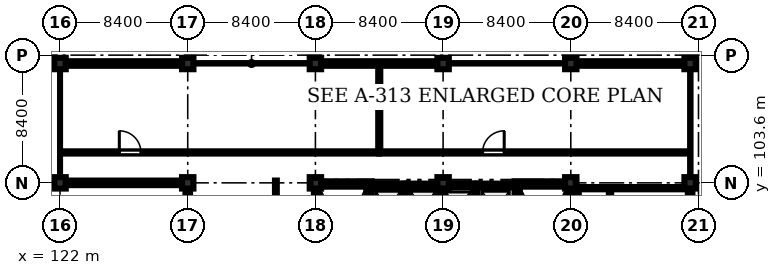
"""IFC4 building model, lengths in metres.
Left out: names, types, materials, properties, quantities, classifications, styles, units other than length and angle.
Written with IfcOpenShell. Run it as: python <this file> out.ifc"""

import sys

from ifc_helpers import new_model, si_unit, direction, frame, frame_2d, origin, origin_2d, place, context, subcontext, project, spatial, rectangle, extrude, element, fill, save


model = new_model("IFC4")
c1 = context("Model", 3, precision=1e-05, world=origin(), true_north=direction((0.0, 1.0)))
c2 = subcontext(c1, "Body", "Model", "MODEL_VIEW")
j1 = project(units=[si_unit("LENGTHUNIT", "METRE"), si_unit("PLANEANGLEUNIT", "RADIAN")], contexts=[c1])
p1 = place(None, origin())
s1 = spatial("IfcSite", under=j1, at=p1, CompositionType="ELEMENT")
p2 = place(p1, origin())
s2 = spatial("IfcBuilding", under=s1, at=p2, CompositionType="ELEMENT")
p3 = place(p2, frame((0.0, 0.0, 44.4)))
s3 = spatial("IfcBuildingStorey", under=s2, at=p3, CompositionType="ELEMENT", Elevation=44.4)
for number, where, z_axis, x_axis in (
    (1, (122.0, 103.6, 0.0), (0.0, 0.0, 1.0), (1.0, 0.0, 0.0)),
    (2, (122.0, 111.45, 0.0), (0.0, 0.0, 1.0), (1.0, 0.0, 0.0)),
    (3, (130.4, 103.6, 0.0), (0.0, 0.0, 1.0), (1.0, 0.0, 0.0)),
    (4, (130.4, 111.45, 0.0), (0.0, 0.0, 1.0), (1.0, 0.0, 0.0)),
    (5, (138.8, 103.6, 0.0), (0.0, 0.0, 1.0), (1.0, 0.0, 0.0)),
    (6, (138.8, 111.45, 0.0), (0.0, 0.0, 1.0), (1.0, 0.0, 0.0)),
    (7, (147.2, 103.6, 0.0), (0.0, 0.0, 1.0), (1.0, 0.0, 0.0)),
    (8, (147.2, 111.45, 0.0), (0.0, 0.0, 1.0), (1.0, 0.0, 0.0)),
    (9, (155.6, 103.6, 0.0), (0.0, 0.0, 1.0), (1.0, 0.0, 0.0)),
    (10, (155.6, 111.45, 0.0), (0.0, 0.0, 1.0), (1.0, 0.0, 0.0)),
    (11, (163.45, 103.6, 0.0), (0.0, 0.0, 1.0), (1.0, 0.0, 0.0)),
    (12, (163.45, 111.45, 0.0), (0.0, 0.0, 1.0), (1.0, 0.0, 0.0)),
):
    element("IfcColumn", number, at=place(p3, frame(where, z_axis=z_axis, x_axis=x_axis)), inside=s3, PredefinedType="COLUMN", context=c2, shape_type="SweptSolid", body=[
        extrude(rectangle(XDim=0.75, YDim=0.75, at=origin_2d()), origin(), (0.0, 0.0, 1.0), 4.01),
    ])
p4 = place(p3, frame((138.7, 103.525, 0.0), z_axis=(0.0, 0.0, 1.0), x_axis=(1.0, 0.0, 0.0)))
e13 = element("IfcWall", 13, at=p4, inside=s3, PredefinedType="SHEAR", context=c2, shape_type="SweptSolid", body=[
    extrude(rectangle(XDim=3.8, YDim=0.35, at=frame_2d((1.9, 0.0))), origin(), (0.0, 0.0, 1.0), 4.01),
])
p5 = place(p3, frame((138.875, 95.45, 0.0), z_axis=(0.0, 0.0, 1.0), x_axis=(0.0, 1.0, 0.0)))
e14 = element("IfcWall", 14, at=p5, inside=s3, PredefinedType="SHEAR", context=c2, shape_type="SweptSolid", body=[
    extrude(rectangle(XDim=7.9, YDim=0.35, at=frame_2d((3.95, 0.0))), origin(), (0.0, 0.0, 1.0), 4.01),
])
p6 = place(p3, frame((142.325, 95.45, 0.0), z_axis=(0.0, 0.0, 1.0), x_axis=(0.0, 1.0, 0.0)))
e15 = element("IfcWall", 15, at=p6, inside=s3, PredefinedType="SHEAR", context=c2, shape_type="SweptSolid", body=[
    extrude(rectangle(XDim=7.9, YDim=0.35, at=frame_2d((3.95, 0.0))), origin(), (0.0, 0.0, 1.0), 4.01),
])
p7 = place(p6, frame((0.22, 0.0, 0.0)))
e16 = element("IfcOpeningElement", 16, at=p7, cuts=e15, PredefinedType="OPENING", context=c2, shape_type="SweptSolid", body=[
    extrude(rectangle(XDim=1.15, YDim=2.15, at=frame_2d((0.575, 1.075))), frame((0.0, 0.185, 0.0), z_axis=(0.0, -1.0, 0.0), x_axis=(1.0, 0.0, 0.0)), (0.0, 0.0, 1.0), 0.37),
])
p8 = place(p3, frame((151.9, 103.525, 0.0), z_axis=(0.0, 0.0, 1.0), x_axis=(1.0, 0.0, 0.0)))
e17 = element("IfcWall", 17, at=p8, inside=s3, PredefinedType="SHEAR", context=c2, shape_type="SweptSolid", body=[
    extrude(rectangle(XDim=3.8, YDim=0.35, at=frame_2d((1.9, 0.0))), origin(), (0.0, 0.0, 1.0), 4.01),
])
p9 = place(p3, frame((152.075, 95.45, 0.0), z_axis=(0.0, 0.0, 1.0), x_axis=(0.0, 1.0, 0.0)))
e18 = element("IfcWall", 18, at=p9, inside=s3, PredefinedType="SHEAR", context=c2, shape_type="SweptSolid", body=[
    extrude(rectangle(XDim=7.9, YDim=0.35, at=frame_2d((3.95, 0.0))), origin(), (0.0, 0.0, 1.0), 4.01),
])
p10 = place(p9, frame((0.35, 0.0, 0.0)))
e19 = element("IfcOpeningElement", 19, at=p10, cuts=e18, PredefinedType="OPENING", context=c2, shape_type="SweptSolid", body=[
    extrude(rectangle(XDim=1.15, YDim=2.15, at=frame_2d((0.575, 1.075))), frame((0.0, 0.185, 0.0), z_axis=(0.0, -1.0, 0.0), x_axis=(1.0, 0.0, 0.0)), (0.0, 0.0, 1.0), 0.37),
])
p11 = place(p3, frame((155.525, 95.45, 0.0), z_axis=(0.0, 0.0, 1.0), x_axis=(0.0, 1.0, 0.0)))
e20 = element("IfcWall", 20, at=p11, inside=s3, PredefinedType="SHEAR", context=c2, shape_type="SweptSolid", body=[
    extrude(rectangle(XDim=7.9, YDim=0.35, at=frame_2d((3.95, 0.0))), origin(), (0.0, 0.0, 1.0), 4.01),
])
p12 = place(p3, frame((142.5, 103.425, 0.0), z_axis=(0.0, 0.0, 1.0), x_axis=(1.0, 0.0, 0.0)))
e21 = element("IfcWall", 21, at=p12, inside=s3, PredefinedType="SHEAR", context=c2, shape_type="SweptSolid", body=[
    extrude(rectangle(XDim=2.1, YDim=0.25, at=frame_2d((1.05, 0.0))), origin(), (0.0, 0.0, 1.0), 4.01),
])
p13 = place(p3, frame((144.725, 100.15, 0.0), z_axis=(0.0, 0.0, 1.0), x_axis=(0.0, 1.0, 0.0)))
e22 = element("IfcWall", 22, at=p13, inside=s3, PredefinedType="SHEAR", context=c2, shape_type="SweptSolid", body=[
    extrude(rectangle(XDim=3.4, YDim=0.25, at=frame_2d((1.7, 0.0))), origin(), (0.0, 0.0, 1.0), 4.01),
])
p14 = place(p3, frame((144.85, 103.425, 0.0), z_axis=(0.0, 0.0, 1.0), x_axis=(1.0, 0.0, 0.0)))
e23 = element("IfcWall", 23, at=p14, inside=s3, PredefinedType="SHEAR", context=c2, shape_type="SweptSolid", body=[
    extrude(rectangle(XDim=2.05, YDim=0.25, at=frame_2d((1.025, 0.0))), origin(), (0.0, 0.0, 1.0), 4.01),
])
p15 = place(p3, frame((147.025, 100.15, 0.0), z_axis=(0.0, 0.0, 1.0), x_axis=(0.0, 1.0, 0.0)))
e24 = element("IfcWall", 24, at=p15, inside=s3, PredefinedType="SHEAR", context=c2, shape_type="SweptSolid", body=[
    extrude(rectangle(XDim=3.4, YDim=0.25, at=frame_2d((1.7, 0.0))), origin(), (0.0, 0.0, 1.0), 4.01),
])
p16 = place(p3, frame((147.15, 103.425, 0.0), z_axis=(0.0, 0.0, 1.0), x_axis=(1.0, 0.0, 0.0)))
e25 = element("IfcWall", 25, at=p16, inside=s3, PredefinedType="SHEAR", context=c2, shape_type="SweptSolid", body=[
    extrude(rectangle(XDim=2.05, YDim=0.25, at=frame_2d((1.025, 0.0))), origin(), (0.0, 0.0, 1.0), 4.01),
])
p17 = place(p3, frame((149.325, 100.35, 0.0), z_axis=(0.0, 0.0, 1.0), x_axis=(0.0, 1.0, 0.0)))
e26 = element("IfcWall", 26, at=p17, inside=s3, PredefinedType="SHEAR", context=c2, shape_type="SweptSolid", body=[
    extrude(rectangle(XDim=3.2, YDim=0.25, at=frame_2d((1.6, 0.0))), origin(), (0.0, 0.0, 1.0), 4.01),
])
p18 = place(p3, frame((149.45, 103.425, 0.0), z_axis=(0.0, 0.0, 1.0), x_axis=(1.0, 0.0, 0.0)))
e27 = element("IfcWall", 27, at=p18, inside=s3, PredefinedType="SHEAR", context=c2, shape_type="SweptSolid", body=[
    extrude(rectangle(XDim=2.45, YDim=0.25, at=frame_2d((1.225, 0.0))), origin(), (0.0, 0.0, 1.0), 4.01),
])
p19 = place(p3, frame((122.375, 111.45, 0.0), z_axis=(0.0, 0.0, 1.0), x_axis=(1.0, 0.0, 0.0)))
e28 = element("IfcWall", 28, at=p19, inside=s3, PredefinedType="STANDARD", context=c2, shape_type="SweptSolid", body=[
    extrude(rectangle(XDim=7.65, YDim=0.3, at=frame_2d((3.825, 0.0))), origin(), (0.0, 0.0, 1.0), 3.31),
])
p20 = place(p19, frame((0.85, 0.0, 0.9)))
e29 = element("IfcOpeningElement", 29, at=p20, cuts=e28, PredefinedType="OPENING", context=c2, shape_type="SweptSolid", body=[
    extrude(rectangle(XDim=1.8, YDim=2.1, at=frame_2d((0.9, 1.05))), frame((0.0, 0.16, 0.0), z_axis=(0.0, -1.0, 0.0), x_axis=(1.0, 0.0, 0.0)), (0.0, 0.0, 1.0), 0.32),
])
p21 = place(p19, frame((4.65, 0.0, 0.9)))
e30 = element("IfcOpeningElement", 30, at=p21, cuts=e28, PredefinedType="OPENING", context=c2, shape_type="SweptSolid", body=[
    extrude(rectangle(XDim=1.8, YDim=2.1, at=frame_2d((0.9, 1.05))), frame((0.0, 0.16, 0.0), z_axis=(0.0, -1.0, 0.0), x_axis=(1.0, 0.0, 0.0)), (0.0, 0.0, 1.0), 0.32),
])
p22 = place(p3, frame((139.175, 111.45, 0.0), z_axis=(0.0, 0.0, 1.0), x_axis=(1.0, 0.0, 0.0)))
e31 = element("IfcWall", 31, at=p22, inside=s3, PredefinedType="STANDARD", context=c2, shape_type="SweptSolid", body=[
    extrude(rectangle(XDim=7.65, YDim=0.3, at=frame_2d((3.825, 0.0))), origin(), (0.0, 0.0, 1.0), 3.31),
])
p23 = place(p22, frame((0.85, 0.0, 0.9)))
e32 = element("IfcOpeningElement", 32, at=p23, cuts=e31, PredefinedType="OPENING", context=c2, shape_type="SweptSolid", body=[
    extrude(rectangle(XDim=1.8, YDim=2.1, at=frame_2d((0.9, 1.05))), frame((0.0, 0.16, 0.0), z_axis=(0.0, -1.0, 0.0), x_axis=(1.0, 0.0, 0.0)), (0.0, 0.0, 1.0), 0.32),
])
p24 = place(p22, frame((4.65, 0.0, 0.9)))
e33 = element("IfcOpeningElement", 33, at=p24, cuts=e31, PredefinedType="OPENING", context=c2, shape_type="SweptSolid", body=[
    extrude(rectangle(XDim=1.8, YDim=2.1, at=frame_2d((0.9, 1.05))), frame((0.0, 0.16, 0.0), z_axis=(0.0, -1.0, 0.0), x_axis=(1.0, 0.0, 0.0)), (0.0, 0.0, 1.0), 0.32),
])
p25 = place(p3, frame((155.975, 111.45, 0.0), z_axis=(0.0, 0.0, 1.0), x_axis=(1.0, 0.0, 0.0)))
e34 = element("IfcWall", 34, at=p25, inside=s3, PredefinedType="STANDARD", context=c2, shape_type="SweptSolid", body=[
    extrude(rectangle(XDim=7.1, YDim=0.3, at=frame_2d((3.55, 0.0))), origin(), (0.0, 0.0, 1.0), 3.31),
])
p26 = place(p25, frame((0.85, 0.0, 0.9)))
e35 = element("IfcOpeningElement", 35, at=p26, cuts=e34, PredefinedType="OPENING", context=c2, shape_type="SweptSolid", body=[
    extrude(rectangle(XDim=1.8, YDim=2.1, at=frame_2d((0.9, 1.05))), frame((0.0, 0.16, 0.0), z_axis=(0.0, -1.0, 0.0), x_axis=(1.0, 0.0, 0.0)), (0.0, 0.0, 1.0), 0.32),
])
p27 = place(p25, frame((4.65, 0.0, 0.9)))
e36 = element("IfcOpeningElement", 36, at=p27, cuts=e34, PredefinedType="OPENING", context=c2, shape_type="SweptSolid", body=[
    extrude(rectangle(XDim=1.8, YDim=2.1, at=frame_2d((0.9, 1.05))), frame((0.0, 0.16, 0.0), z_axis=(0.0, -1.0, 0.0), x_axis=(1.0, 0.0, 0.0)), (0.0, 0.0, 1.0), 0.32),
])
p28 = place(p3, frame((163.45, 103.225, 0.0), z_axis=(0.0, 0.0, 1.0), x_axis=(0.0, -1.0, 0.0)))
e37 = element("IfcWall", 37, at=p28, inside=s3, PredefinedType="STANDARD", context=c2, shape_type="SweptSolid", body=[
    extrude(rectangle(XDim=7.65, YDim=0.3, at=frame_2d((3.825, 0.0))), origin(), (0.0, 0.0, 1.0), 3.31),
])
p29 = place(p28, frame((1.15, 0.0, 1.1)))
e38 = element("IfcOpeningElement", 38, at=p29, cuts=e37, PredefinedType="OPENING", context=c2, shape_type="SweptSolid", body=[
    extrude(rectangle(XDim=1.4, YDim=1.4, at=frame_2d((0.7, 0.7))), frame((0.0, 0.16, 0.0), z_axis=(0.0, -1.0, 0.0), x_axis=(1.0, 0.0, 0.0)), (0.0, 0.0, 1.0), 0.32),
])
p30 = place(p3, frame((130.4, 95.575, 0.0), z_axis=(0.0, 0.0, 1.0), x_axis=(0.0, 1.0, 0.0)))
e39 = element("IfcWall", 39, at=p30, inside=s3, PredefinedType="STANDARD", context=c2, shape_type="SweptSolid", body=[
    extrude(rectangle(XDim=7.65, YDim=0.3, at=frame_2d((3.825, 0.0))), origin(), (0.0, 0.0, 1.0), 3.31),
])
p31 = place(p30, frame((2.4, 0.0, 1.0)))
e40 = element("IfcOpeningElement", 40, at=p31, cuts=e39, PredefinedType="OPENING", context=c2, shape_type="SweptSolid", body=[
    extrude(rectangle(XDim=1.8, YDim=1.8, at=frame_2d((0.9, 0.9))), frame((0.0, 0.16, 0.0), z_axis=(0.0, -1.0, 0.0), x_axis=(1.0, 0.0, 0.0)), (0.0, 0.0, 1.0), 0.32),
])
p32 = place(p3, frame((130.025, 103.6, 0.0), z_axis=(0.0, 0.0, 1.0), x_axis=(-1.0, 0.0, 0.0)))
e41 = element("IfcWall", 41, at=p32, inside=s3, PredefinedType="STANDARD", context=c2, shape_type="SweptSolid", body=[
    extrude(rectangle(XDim=7.65, YDim=0.3, at=frame_2d((3.825, 0.0))), origin(), (0.0, 0.0, 1.0), 3.31),
])
p33 = place(p3, frame((158.18, 94.68, 0.0), z_axis=(0.0, 0.0, 1.0), x_axis=(0.0, 1.0, 0.0)))
e42 = element("IfcWall", 42, at=p33, inside=s3, PredefinedType="PARTITIONING", context=c2, shape_type="SweptSolid", body=[
    extrude(rectangle(XDim=8.57, YDim=0.15, at=frame_2d((4.285, 0.0))), origin(), (0.0, 0.0, 1.0), 4.01),
])
p34 = place(p33, frame((0.8, 0.0, 0.0)))
e43 = element("IfcOpeningElement", 43, at=p34, cuts=e42, PredefinedType="OPENING", context=c2, shape_type="SweptSolid", body=[
    extrude(rectangle(XDim=1.0, YDim=2.12, at=frame_2d((0.5, 1.06))), frame((0.0, 0.085, 0.0), z_axis=(0.0, -1.0, 0.0), x_axis=(1.0, 0.0, 0.0)), (0.0, 0.0, 1.0), 0.17),
])
p35 = place(p33, frame((3.5, 0.0, 0.0)))
e44 = element("IfcOpeningElement", 44, at=p35, cuts=e42, PredefinedType="OPENING", context=c2, shape_type="SweptSolid", body=[
    extrude(rectangle(XDim=0.92, YDim=2.1, at=frame_2d((0.46, 1.05))), frame((0.0, 0.085, 0.0), z_axis=(0.0, -1.0, 0.0), x_axis=(1.0, 0.0, 0.0)), (0.0, 0.0, 1.0), 0.17),
])
p36 = place(p33, frame((6.4, 0.0, 0.0)))
e45 = element("IfcOpeningElement", 45, at=p36, cuts=e42, PredefinedType="OPENING", context=c2, shape_type="SweptSolid", body=[
    extrude(rectangle(XDim=0.92, YDim=2.1, at=frame_2d((0.46, 1.05))), frame((0.0, 0.085, 0.0), z_axis=(0.0, -1.0, 0.0), x_axis=(1.0, 0.0, 0.0)), (0.0, 0.0, 1.0), 0.17),
])
p37 = place(p3, frame((156.05, 103.25, 0.0), z_axis=(0.0, 0.0, 1.0), x_axis=(1.0, 0.0, 0.0)))
e46 = element("IfcWall", 46, at=p37, inside=s3, PredefinedType="PARTITIONING", context=c2, shape_type="SweptSolid", body=[
    extrude(rectangle(XDim=7.15, YDim=0.15, at=frame_2d((3.575, 0.0))), origin(), (0.0, 0.0, 1.0), 4.01),
])
p38 = place(p3, frame((156.05, 94.68, 0.0), z_axis=(0.0, 0.0, 1.0), x_axis=(0.0, 1.0, 0.0)))
e47 = element("IfcWall", 47, at=p38, inside=s3, PredefinedType="PARTITIONING", context=c2, shape_type="SweptSolid", body=[
    extrude(rectangle(XDim=8.57, YDim=0.15, at=frame_2d((4.285, 0.0))), origin(), (0.0, 0.0, 1.0), 4.01),
])
p39 = place(p3, frame((136.2, 94.68, 0.0), z_axis=(0.0, 0.0, 1.0), x_axis=(0.0, 1.0, 0.0)))
e48 = element("IfcWall", 48, at=p39, inside=s3, PredefinedType="PARTITIONING", context=c2, shape_type="SweptSolid", body=[
    extrude(rectangle(XDim=9.07, YDim=0.12, at=frame_2d((4.535, 0.0))), origin(), (0.0, 0.0, 1.0), 4.01),
])
p40 = place(p3, frame((122.15, 105.6, 0.0), z_axis=(0.0, 0.0, 1.0), x_axis=(1.0, 0.0, 0.0)))
e49 = element("IfcWall", 49, at=p40, inside=s3, PredefinedType="PARTITIONING", context=c2, shape_type="SweptSolid", body=[
    extrude(rectangle(XDim=20.85, YDim=0.145, at=frame_2d((10.425, 0.0))), origin(), (0.0, 0.0, 1.0), 4.01),
])
p41 = place(p40, frame((3.75, 0.0, 0.0)))
e50 = element("IfcOpeningElement", 50, at=p41, cuts=e49, PredefinedType="OPENING", context=c2, shape_type="SweptSolid", body=[
    extrude(rectangle(XDim=1.42, YDim=2.22, at=frame_2d((0.71, 1.11))), frame((0.0, 0.083, 0.0), z_axis=(0.0, -1.0, 0.0), x_axis=(1.0, 0.0, 0.0)), (0.0, 0.0, 1.0), 0.165),
])
p42 = place(p3, frame((143.0, 105.6, 0.0), z_axis=(0.0, 0.0, 1.0), x_axis=(1.0, 0.0, 0.0)))
e51 = element("IfcWall", 51, at=p42, inside=s3, PredefinedType="PARTITIONING", context=c2, shape_type="SweptSolid", body=[
    extrude(rectangle(XDim=20.35, YDim=0.145, at=frame_2d((10.175, 0.0))), origin(), (0.0, 0.0, 1.0), 4.01),
])
p43 = place(p42, frame((6.8, 0.0, 0.0)))
e52 = element("IfcOpeningElement", 52, at=p43, cuts=e51, PredefinedType="OPENING", context=c2, shape_type="SweptSolid", body=[
    extrude(rectangle(XDim=1.42, YDim=2.22, at=frame_2d((0.71, 1.11))), frame((0.0, 0.083, 0.0), z_axis=(0.0, -1.0, 0.0), x_axis=(1.0, 0.0, 0.0)), (0.0, 0.0, 1.0), 0.165),
])
p44 = place(p3, frame((143.0, 105.6, 0.0), z_axis=(0.0, 0.0, 1.0), x_axis=(0.0, 1.0, 0.0)))
e53 = element("IfcWall", 53, at=p44, inside=s3, PredefinedType="PARTITIONING", context=c2, shape_type="SweptSolid", body=[
    extrude(rectangle(XDim=5.75, YDim=0.135, at=frame_2d((2.875, 0.0))), origin(), (0.0, 0.0, 1.0), 3.56),
])
p45 = place(p20, origin())
e54 = element("IfcWindow", 54, at=p45, inside=s3, PartitioningType="DOUBLE_PANEL_VERTICAL", PredefinedType="WINDOW", context=c2, shape_type="SweptSolid", body=[
    extrude(rectangle(XDim=1.8, YDim=2.1, at=frame_2d((0.9, 1.05))), frame((0.0, 0.03, 0.0), z_axis=(0.0, -1.0, 0.0), x_axis=(1.0, 0.0, 0.0)), (0.0, 0.0, 1.0), 0.06),
])
fill(e29, e54)
p46 = place(p21, origin())
e55 = element("IfcWindow", 55, at=p46, inside=s3, PartitioningType="DOUBLE_PANEL_VERTICAL", PredefinedType="WINDOW", context=c2, shape_type="SweptSolid", body=[
    extrude(rectangle(XDim=1.8, YDim=2.1, at=frame_2d((0.9, 1.05))), frame((0.0, 0.03, 0.0), z_axis=(0.0, -1.0, 0.0), x_axis=(1.0, 0.0, 0.0)), (0.0, 0.0, 1.0), 0.06),
])
fill(e30, e55)
p47 = place(p23, origin())
e56 = element("IfcWindow", 56, at=p47, inside=s3, PartitioningType="DOUBLE_PANEL_VERTICAL", PredefinedType="WINDOW", context=c2, shape_type="SweptSolid", body=[
    extrude(rectangle(XDim=1.8, YDim=2.1, at=frame_2d((0.9, 1.05))), frame((0.0, 0.03, 0.0), z_axis=(0.0, -1.0, 0.0), x_axis=(1.0, 0.0, 0.0)), (0.0, 0.0, 1.0), 0.06),
])
fill(e32, e56)
p48 = place(p24, origin())
e57 = element("IfcWindow", 57, at=p48, inside=s3, PartitioningType="DOUBLE_PANEL_VERTICAL", PredefinedType="WINDOW", context=c2, shape_type="SweptSolid", body=[
    extrude(rectangle(XDim=1.8, YDim=2.1, at=frame_2d((0.9, 1.05))), frame((0.0, 0.03, 0.0), z_axis=(0.0, -1.0, 0.0), x_axis=(1.0, 0.0, 0.0)), (0.0, 0.0, 1.0), 0.06),
])
fill(e33, e57)
p49 = place(p26, origin())
e58 = element("IfcWindow", 58, at=p49, inside=s3, PartitioningType="DOUBLE_PANEL_VERTICAL", PredefinedType="WINDOW", context=c2, shape_type="SweptSolid", body=[
    extrude(rectangle(XDim=1.8, YDim=2.1, at=frame_2d((0.9, 1.05))), frame((0.0, 0.03, 0.0), z_axis=(0.0, -1.0, 0.0), x_axis=(1.0, 0.0, 0.0)), (0.0, 0.0, 1.0), 0.06),
])
fill(e35, e58)
p50 = place(p27, origin())
e59 = element("IfcWindow", 59, at=p50, inside=s3, PartitioningType="DOUBLE_PANEL_VERTICAL", PredefinedType="WINDOW", context=c2, shape_type="SweptSolid", body=[
    extrude(rectangle(XDim=1.8, YDim=2.1, at=frame_2d((0.9, 1.05))), frame((0.0, 0.03, 0.0), z_axis=(0.0, -1.0, 0.0), x_axis=(1.0, 0.0, 0.0)), (0.0, 0.0, 1.0), 0.06),
])
fill(e36, e59)
p51 = place(p41, origin())
e60 = element("IfcDoor", 60, at=p51, inside=s3, OperationType="SINGLE_SWING_LEFT", PredefinedType="DOOR", context=c2, shape_type="SweptSolid", body=[
    extrude(rectangle(XDim=1.42, YDim=2.22, at=frame_2d((0.71, 1.11))), frame((0.0, 0.025, 0.0), z_axis=(0.0, -1.0, 0.0), x_axis=(1.0, 0.0, 0.0)), (0.0, 0.0, 1.0), 0.05),
])
fill(e50, e60)
p52 = place(p43, origin())
e61 = element("IfcDoor", 61, at=p52, inside=s3, OperationType="SINGLE_SWING_RIGHT", PredefinedType="DOOR", context=c2, shape_type="SweptSolid", body=[
    extrude(rectangle(XDim=1.42, YDim=2.22, at=frame_2d((0.71, 1.11))), frame((0.0, 0.025, 0.0), z_axis=(0.0, -1.0, 0.0), x_axis=(1.0, 0.0, 0.0)), (0.0, 0.0, 1.0), 0.05),
])
fill(e52, e61)
save(model, sys.argv[1])
